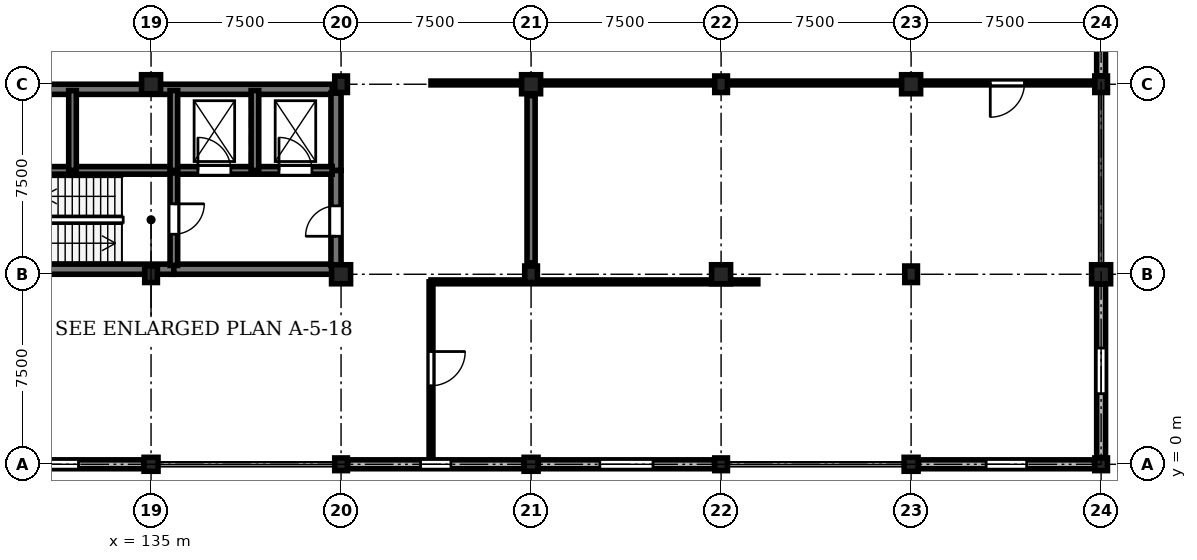
"""IFC4 building model, lengths in metres.
Left out: names, types, materials, properties, quantities, classifications, styles, units other than length and angle.
Written with IfcOpenShell. Run it as: python <this file> out.ifc"""

import sys

from ifc_helpers import new_model, si_unit, direction, frame, frame_2d, origin, origin_2d, place, context, subcontext, project, spatial, rectangle, extrude, element, fill, save


model = new_model("IFC4")
c1 = context("Model", 3, precision=1e-05, world=origin(), true_north=direction((0.0, 1.0)))
c2 = subcontext(c1, "Body", "Model", "MODEL_VIEW")
j1 = project(units=[si_unit("LENGTHUNIT", "METRE"), si_unit("PLANEANGLEUNIT", "RADIAN")], contexts=[c1])
p1 = place(None, origin())
s1 = spatial("IfcSite", under=j1, at=p1, CompositionType="ELEMENT")
p2 = place(p1, origin())
s2 = spatial("IfcBuilding", under=s1, at=p2, CompositionType="ELEMENT")
p3 = place(p2, frame((0.0, 0.0, 4.8)))
s3 = spatial("IfcBuildingStorey", under=s2, at=p3, CompositionType="ELEMENT", Elevation=4.8)
p4 = place(p3, frame((135.0, 0.0, 0.0), z_axis=(0.0, 0.0, 1.0), x_axis=(1.0, 0.0, 0.0)))
e1 = element("IfcColumn", 1, at=p4, inside=s3, PredefinedType="COLUMN", context=c2, shape_type="SweptSolid", body=[
    extrude(rectangle(XDim=0.55, YDim=0.55, at=origin_2d()), origin(), (0.0, 0.0, 1.0), 4.5),
])
p5 = place(p3, frame((135.0, 7.5, 0.0), z_axis=(0.0, 0.0, 1.0), x_axis=(1.0, 0.0, 0.0)))
e2 = element("IfcColumn", 2, at=p5, inside=s3, PredefinedType="COLUMN", context=c2, shape_type="SweptSolid", body=[
    extrude(rectangle(XDim=0.5, YDim=0.65, at=origin_2d()), origin(), (0.0, 0.0, 1.0), 4.5),
])
p6 = place(p3, frame((135.0, 15.0, 0.0), z_axis=(0.0, 0.0, 1.0), x_axis=(1.0, 0.0, 0.0)))
e3 = element("IfcColumn", 3, at=p6, inside=s3, PredefinedType="COLUMN", context=c2, shape_type="SweptSolid", body=[
    extrude(rectangle(XDim=0.75, YDim=0.75, at=origin_2d()), origin(), (0.0, 0.0, 1.0), 4.5),
])
p7 = place(p3, frame((142.5, 0.0, 0.0), z_axis=(0.0, 0.0, 1.0), x_axis=(1.0, 0.0, 0.0)))
e4 = element("IfcColumn", 4, at=p7, inside=s3, PredefinedType="COLUMN", context=c2, shape_type="SweptSolid", body=[
    extrude(rectangle(XDim=0.5, YDim=0.5, at=origin_2d()), origin(), (0.0, 0.0, 1.0), 4.5),
])
p8 = place(p3, frame((142.5, 7.5, 0.0), z_axis=(0.0, 0.0, 1.0), x_axis=(1.0, 0.0, 0.0)))
e5 = element("IfcColumn", 5, at=p8, inside=s3, PredefinedType="COLUMN", context=c2, shape_type="SweptSolid", body=[
    extrude(rectangle(XDim=0.75, YDim=0.75, at=origin_2d()), origin(), (0.0, 0.0, 1.0), 4.5),
])
p9 = place(p3, frame((142.5, 15.0, 0.0), z_axis=(0.0, 0.0, 1.0), x_axis=(1.0, 0.0, 0.0)))
e6 = element("IfcColumn", 6, at=p9, inside=s3, PredefinedType="COLUMN", context=c2, shape_type="SweptSolid", body=[
    extrude(rectangle(XDim=0.5, YDim=0.65, at=origin_2d()), origin(), (0.0, 0.0, 1.0), 4.5),
])
p10 = place(p3, frame((150.0, 0.0, 0.0), z_axis=(0.0, 0.0, 1.0), x_axis=(1.0, 0.0, 0.0)))
e7 = element("IfcColumn", 7, at=p10, inside=s3, PredefinedType="COLUMN", context=c2, shape_type="SweptSolid", body=[
    extrude(rectangle(XDim=0.55, YDim=0.55, at=origin_2d()), origin(), (0.0, 0.0, 1.0), 4.5),
])
p11 = place(p3, frame((150.0, 7.5, 0.0), z_axis=(0.0, 0.0, 1.0), x_axis=(1.0, 0.0, 0.0)))
e8 = element("IfcColumn", 8, at=p11, inside=s3, PredefinedType="COLUMN", context=c2, shape_type="SweptSolid", body=[
    extrude(rectangle(XDim=0.5, YDim=0.65, at=origin_2d()), origin(), (0.0, 0.0, 1.0), 4.5),
])
p12 = place(p3, frame((150.0, 15.0, 0.0), z_axis=(0.0, 0.0, 1.0), x_axis=(1.0, 0.0, 0.0)))
e9 = element("IfcColumn", 9, at=p12, inside=s3, PredefinedType="COLUMN", context=c2, shape_type="SweptSolid", body=[
    extrude(rectangle(XDim=0.75, YDim=0.75, at=origin_2d()), origin(), (0.0, 0.0, 1.0), 4.5),
])
p13 = place(p3, frame((157.5, 0.0, 0.0), z_axis=(0.0, 0.0, 1.0), x_axis=(1.0, 0.0, 0.0)))
e10 = element("IfcColumn", 10, at=p13, inside=s3, PredefinedType="COLUMN", context=c2, shape_type="SweptSolid", body=[
    extrude(rectangle(XDim=0.5, YDim=0.5, at=origin_2d()), origin(), (0.0, 0.0, 1.0), 4.5),
])
p14 = place(p3, frame((157.5, 7.5, 0.0), z_axis=(0.0, 0.0, 1.0), x_axis=(1.0, 0.0, 0.0)))
e11 = element("IfcColumn", 11, at=p14, inside=s3, PredefinedType="COLUMN", context=c2, shape_type="SweptSolid", body=[
    extrude(rectangle(XDim=0.75, YDim=0.75, at=origin_2d()), origin(), (0.0, 0.0, 1.0), 4.5),
])
p15 = place(p3, frame((157.5, 15.0, 0.0), z_axis=(0.0, 0.0, 1.0), x_axis=(1.0, 0.0, 0.0)))
e12 = element("IfcColumn", 12, at=p15, inside=s3, PredefinedType="COLUMN", context=c2, shape_type="SweptSolid", body=[
    extrude(rectangle(XDim=0.5, YDim=0.65, at=origin_2d()), origin(), (0.0, 0.0, 1.0), 4.5),
])
p16 = place(p3, frame((165.0, 0.0, 0.0), z_axis=(0.0, 0.0, 1.0), x_axis=(1.0, 0.0, 0.0)))
e13 = element("IfcColumn", 13, at=p16, inside=s3, PredefinedType="COLUMN", context=c2, shape_type="SweptSolid", body=[
    extrude(rectangle(XDim=0.55, YDim=0.55, at=origin_2d()), origin(), (0.0, 0.0, 1.0), 4.5),
])
p17 = place(p3, frame((165.0, 7.5, 0.0), z_axis=(0.0, 0.0, 1.0), x_axis=(1.0, 0.0, 0.0)))
e14 = element("IfcColumn", 14, at=p17, inside=s3, PredefinedType="COLUMN", context=c2, shape_type="SweptSolid", body=[
    extrude(rectangle(XDim=0.5, YDim=0.65, at=origin_2d()), origin(), (0.0, 0.0, 1.0), 4.5),
])
p18 = place(p3, frame((165.0, 15.0, 0.0), z_axis=(0.0, 0.0, 1.0), x_axis=(1.0, 0.0, 0.0)))
e15 = element("IfcColumn", 15, at=p18, inside=s3, PredefinedType="COLUMN", context=c2, shape_type="SweptSolid", body=[
    extrude(rectangle(XDim=0.75, YDim=0.75, at=origin_2d()), origin(), (0.0, 0.0, 1.0), 4.5),
])
p19 = place(p3, frame((172.5, 0.0, 0.0), z_axis=(0.0, 0.0, 1.0), x_axis=(1.0, 0.0, 0.0)))
e16 = element("IfcColumn", 16, at=p19, inside=s3, PredefinedType="COLUMN", context=c2, shape_type="SweptSolid", body=[
    extrude(rectangle(XDim=0.5, YDim=0.5, at=origin_2d()), origin(), (0.0, 0.0, 1.0), 4.5),
])
p20 = place(p3, frame((172.5, 7.5, 0.0), z_axis=(0.0, 0.0, 1.0), x_axis=(1.0, 0.0, 0.0)))
e17 = element("IfcColumn", 17, at=p20, inside=s3, PredefinedType="COLUMN", context=c2, shape_type="SweptSolid", body=[
    extrude(rectangle(XDim=0.75, YDim=0.75, at=origin_2d()), origin(), (0.0, 0.0, 1.0), 4.5),
])
p21 = place(p3, frame((172.5, 15.0, 0.0), z_axis=(0.0, 0.0, 1.0), x_axis=(1.0, 0.0, 0.0)))
e18 = element("IfcColumn", 18, at=p21, inside=s3, PredefinedType="COLUMN", context=c2, shape_type="SweptSolid", body=[
    extrude(rectangle(XDim=0.5, YDim=0.65, at=origin_2d()), origin(), (0.0, 0.0, 1.0), 4.5),
])
p22 = place(p3, frame((150.0, 7.95, 0.0), z_axis=(0.0, 0.0, 1.0), x_axis=(0.0, 1.0, 0.0)))
e19 = element("IfcWall", 19, at=p22, inside=s3, PredefinedType="SHEAR", context=c2, shape_type="SweptSolid", body=[
    extrude(rectangle(XDim=6.6, YDim=0.32, at=frame_2d((3.3, 0.0))), origin(), (0.0, 0.0, 1.0), 3.63),
])
p23 = place(p3, frame((134.715, 0.0, 0.0), z_axis=(0.0, 0.0, 1.0), x_axis=(-1.0, 0.0, 0.0)))
e20 = element("IfcWall", 20, at=p23, inside=s3, PredefinedType="STANDARD", context=c2, shape_type="SweptSolid", body=[
    extrude(rectangle(XDim=6.955, YDim=0.35, at=frame_2d((3.478, 0.0))), origin(), (0.0, 0.0, 1.0), 3.63),
])
p24 = place(p23, frame((2.577, 0.0, 0.9)))
e21 = element("IfcOpeningElement", 21, at=p24, cuts=e20, PredefinedType="OPENING", context=c2, shape_type="SweptSolid", body=[
    extrude(rectangle(XDim=1.8, YDim=2.1, at=frame_2d((0.9, 1.05))), frame((0.0, 0.185, 0.0), z_axis=(0.0, -1.0, 0.0), x_axis=(1.0, 0.0, 0.0)), (0.0, 0.0, 1.0), 0.37),
])
p25 = place(p3, frame((149.715, 0.0, 0.0), z_axis=(0.0, 0.0, 1.0), x_axis=(-1.0, 0.0, 0.0)))
e22 = element("IfcWall", 22, at=p25, inside=s3, PredefinedType="STANDARD", context=c2, shape_type="SweptSolid", body=[
    extrude(rectangle(XDim=6.955, YDim=0.35, at=frame_2d((3.478, 0.0))), origin(), (0.0, 0.0, 1.0), 3.63),
])
p26 = place(p25, frame((2.877, 0.0, 0.9)))
e23 = element("IfcOpeningElement", 23, at=p26, cuts=e22, PredefinedType="OPENING", context=c2, shape_type="SweptSolid", body=[
    extrude(rectangle(XDim=1.2, YDim=2.1, at=frame_2d((0.6, 1.05))), frame((0.0, 0.185, 0.0), z_axis=(0.0, -1.0, 0.0), x_axis=(1.0, 0.0, 0.0)), (0.0, 0.0, 1.0), 0.37),
])
p27 = place(p3, frame((157.24, 0.0, 0.0), z_axis=(0.0, 0.0, 1.0), x_axis=(-1.0, 0.0, 0.0)))
e24 = element("IfcWall", 24, at=p27, inside=s3, PredefinedType="STANDARD", context=c2, shape_type="SweptSolid", body=[
    extrude(rectangle(XDim=6.955, YDim=0.35, at=frame_2d((3.478, 0.0))), origin(), (0.0, 0.0, 1.0), 3.63),
])
p28 = place(p27, frame((2.427, 0.0, 0.9)))
e25 = element("IfcOpeningElement", 25, at=p28, cuts=e24, PredefinedType="OPENING", context=c2, shape_type="SweptSolid", body=[
    extrude(rectangle(XDim=2.1, YDim=2.1, at=frame_2d((1.05, 1.05))), frame((0.0, 0.185, 0.0), z_axis=(0.0, -1.0, 0.0), x_axis=(1.0, 0.0, 0.0)), (0.0, 0.0, 1.0), 0.37),
])
p29 = place(p3, frame((172.24, 0.0, 0.0), z_axis=(0.0, 0.0, 1.0), x_axis=(-1.0, 0.0, 0.0)))
e26 = element("IfcWall", 26, at=p29, inside=s3, PredefinedType="STANDARD", context=c2, shape_type="SweptSolid", body=[
    extrude(rectangle(XDim=6.955, YDim=0.35, at=frame_2d((3.478, 0.0))), origin(), (0.0, 0.0, 1.0), 3.63),
])
p30 = place(p29, frame((2.677, 0.0, 0.9)))
e27 = element("IfcOpeningElement", 27, at=p30, cuts=e26, PredefinedType="OPENING", context=c2, shape_type="SweptSolid", body=[
    extrude(rectangle(XDim=1.6, YDim=1.95, at=frame_2d((0.8, 0.975))), frame((0.0, 0.185, 0.0), z_axis=(0.0, -1.0, 0.0), x_axis=(1.0, 0.0, 0.0)), (0.0, 0.0, 1.0), 0.37),
])
p31 = place(p3, frame((172.5, 7.115, 0.0), z_axis=(0.0, 0.0, 1.0), x_axis=(0.0, -1.0, 0.0)))
e28 = element("IfcWall", 28, at=p31, inside=s3, PredefinedType="STANDARD", context=c2, shape_type="SweptSolid", body=[
    extrude(rectangle(XDim=6.855, YDim=0.35, at=frame_2d((3.427, 0.0))), origin(), (0.0, 0.0, 1.0), 3.63),
])
p32 = place(p31, frame((2.528, 0.0, 0.9)))
e29 = element("IfcOpeningElement", 29, at=p32, cuts=e28, PredefinedType="OPENING", context=c2, shape_type="SweptSolid", body=[
    extrude(rectangle(XDim=1.8, YDim=1.95, at=frame_2d((0.9, 0.975))), frame((0.0, 0.185, 0.0), z_axis=(0.0, -1.0, 0.0), x_axis=(1.0, 0.0, 0.0)), (0.0, 0.0, 1.0), 0.37),
])
p33 = place(p3, frame((172.5, 22.115, 0.0), z_axis=(0.0, 0.0, 1.0), x_axis=(0.0, -1.0, 0.0)))
e30 = element("IfcWall", 30, at=p33, inside=s3, PredefinedType="STANDARD", context=c2, shape_type="SweptSolid", body=[
    extrude(rectangle(XDim=6.78, YDim=0.35, at=frame_2d((3.39, 0.0))), origin(), (0.0, 0.0, 1.0), 3.63),
])
p34 = place(p33, frame((2.29, 0.0, 0.9)))
e31 = element("IfcOpeningElement", 31, at=p34, cuts=e30, PredefinedType="OPENING", context=c2, shape_type="SweptSolid", body=[
    extrude(rectangle(XDim=2.2, YDim=1.95, at=frame_2d((1.1, 0.975))), frame((0.0, 0.185, 0.0), z_axis=(0.0, -1.0, 0.0), x_axis=(1.0, 0.0, 0.0)), (0.0, 0.0, 1.0), 0.37),
])
p35 = place(p3, frame((127.85, 7.7, 0.0), z_axis=(0.0, 0.0, 1.0), x_axis=(1.0, 0.0, 0.0)))
e32 = element("IfcWall", 32, at=p35, inside=s3, PredefinedType="SHEAR", context=c2, shape_type="SweptSolid", body=[
    extrude(rectangle(XDim=8.05, YDim=0.4, at=frame_2d((4.025, 0.0))), origin(), (0.0, 0.0, 1.0), 4.18),
])
p36 = place(p3, frame((135.9, 7.7, 0.0), z_axis=(0.0, 0.0, 1.0), x_axis=(1.0, 0.0, 0.0)))
e33 = element("IfcWall", 33, at=p36, inside=s3, PredefinedType="SHEAR", context=c2, shape_type="SweptSolid", body=[
    extrude(rectangle(XDim=6.25, YDim=0.4, at=frame_2d((3.125, 0.0))), origin(), (0.0, 0.0, 1.0), 4.18),
])
p37 = place(p3, frame((127.85, 14.8, 0.0), z_axis=(0.0, 0.0, 1.0), x_axis=(1.0, 0.0, 0.0)))
e34 = element("IfcWall", 34, at=p37, inside=s3, PredefinedType="SHEAR", context=c2, shape_type="SweptSolid", body=[
    extrude(rectangle(XDim=14.3, YDim=0.4, at=frame_2d((7.15, 0.0))), origin(), (0.0, 0.0, 1.0), 4.18),
])
p38 = place(p3, frame((142.3, 7.85, 0.0), z_axis=(0.0, 0.0, 1.0), x_axis=(0.0, 1.0, 0.0)))
e35 = element("IfcWall", 35, at=p38, inside=s3, PredefinedType="SHEAR", context=c2, shape_type="SweptSolid", body=[
    extrude(rectangle(XDim=3.75, YDim=0.4, at=frame_2d((1.875, 0.0))), origin(), (0.0, 0.0, 1.0), 4.18),
])
p39 = place(p38, frame((1.15, 0.0, 0.0)))
e36 = element("IfcOpeningElement", 36, at=p39, cuts=e35, PredefinedType="OPENING", context=c2, shape_type="SweptSolid", body=[
    extrude(rectangle(XDim=1.2, YDim=2.25, at=frame_2d((0.6, 1.125))), frame((0.0, 0.21, 0.0), z_axis=(0.0, -1.0, 0.0), x_axis=(1.0, 0.0, 0.0)), (0.0, 0.0, 1.0), 0.42),
])
p40 = place(p3, frame((142.3, 11.6, 0.0), z_axis=(0.0, 0.0, 1.0), x_axis=(0.0, 1.0, 0.0)))
e37 = element("IfcWall", 37, at=p40, inside=s3, PredefinedType="SHEAR", context=c2, shape_type="SweptSolid", body=[
    extrude(rectangle(XDim=3.05, YDim=0.4, at=frame_2d((1.525, 0.0))), origin(), (0.0, 0.0, 1.0), 4.18),
])
p41 = place(p3, frame((127.85, 11.6, 0.0), z_axis=(0.0, 0.0, 1.0), x_axis=(1.0, 0.0, 0.0)))
e38 = element("IfcWall", 38, at=p41, inside=s3, PredefinedType="SHEAR", context=c2, shape_type="SweptSolid", body=[
    extrude(rectangle(XDim=8.05, YDim=0.3, at=frame_2d((4.025, 0.0))), origin(), (0.0, 0.0, 1.0), 4.18),
])
p42 = place(p3, frame((135.9, 11.6, 0.0), z_axis=(0.0, 0.0, 1.0), x_axis=(1.0, 0.0, 0.0)))
e39 = element("IfcWall", 39, at=p42, inside=s3, PredefinedType="SHEAR", context=c2, shape_type="SweptSolid", body=[
    extrude(rectangle(XDim=6.25, YDim=0.3, at=frame_2d((3.125, 0.0))), origin(), (0.0, 0.0, 1.0), 4.18),
])
p43 = place(p42, frame((0.95, 0.0, 0.0)))
e40 = element("IfcOpeningElement", 40, at=p43, cuts=e39, PredefinedType="OPENING", context=c2, shape_type="SweptSolid", body=[
    extrude(rectangle(XDim=1.3, YDim=2.2, at=frame_2d((0.65, 1.1))), frame((0.0, 0.16, 0.0), z_axis=(0.0, -1.0, 0.0), x_axis=(1.0, 0.0, 0.0)), (0.0, 0.0, 1.0), 0.32),
])
p44 = place(p42, frame((4.15, 0.0, 0.0)))
e41 = element("IfcOpeningElement", 41, at=p44, cuts=e39, PredefinedType="OPENING", context=c2, shape_type="SweptSolid", body=[
    extrude(rectangle(XDim=1.3, YDim=2.2, at=frame_2d((0.65, 1.1))), frame((0.0, 0.16, 0.0), z_axis=(0.0, -1.0, 0.0), x_axis=(1.0, 0.0, 0.0)), (0.0, 0.0, 1.0), 0.32),
])
p45 = place(p3, frame((135.9, 11.5, 0.0), z_axis=(0.0, 0.0, 1.0), x_axis=(0.0, -1.0, 0.0)))
e42 = element("IfcWall", 42, at=p45, inside=s3, PredefinedType="SHEAR", context=c2, shape_type="SweptSolid", body=[
    extrude(rectangle(XDim=3.65, YDim=0.3, at=frame_2d((1.825, 0.0))), origin(), (0.0, 0.0, 1.0), 4.18),
])
p46 = place(p45, frame((1.22, 0.0, 0.0)))
e43 = element("IfcOpeningElement", 43, at=p46, cuts=e42, PredefinedType="OPENING", context=c2, shape_type="SweptSolid", body=[
    extrude(rectangle(XDim=1.2, YDim=2.25, at=frame_2d((0.6, 1.125))), frame((0.0, 0.16, 0.0), z_axis=(0.0, -1.0, 0.0), x_axis=(1.0, 0.0, 0.0)), (0.0, 0.0, 1.0), 0.32),
])
for number, where, z_axis, x_axis in (
    (44, (131.9, 11.6, 0.0), (0.0, 0.0, 1.0), (0.0, 1.0, 0.0)),
    (45, (135.9, 11.6, 0.0), (0.0, 0.0, 1.0), (0.0, 1.0, 0.0)),
    (46, (139.1, 11.6, 0.0), (0.0, 0.0, 1.0), (0.0, 1.0, 0.0)),
):
    element("IfcWall", number, at=place(p3, frame(where, z_axis=z_axis, x_axis=x_axis)), inside=s3, PredefinedType="SHEAR", context=c2, shape_type="SweptSolid", body=[
        extrude(rectangle(XDim=3.15, YDim=0.3, at=frame_2d((1.575, 0.0))), origin(), (0.0, 0.0, 1.0), 4.18),
    ])
p47 = place(p3, frame((146.05, 7.2, 0.0), z_axis=(0.0, 0.0, 1.0), x_axis=(0.0, -1.0, 0.0)))
e47 = element("IfcWall", 47, at=p47, inside=s3, PredefinedType="PARTITIONING", context=c2, shape_type="SweptSolid", body=[
    extrude(rectangle(XDim=6.85, YDim=0.15, at=frame_2d((3.425, 0.0))), origin(), (0.0, 0.0, 1.0), 4.165),
])
p48 = place(p47, frame((2.75, 0.0, 0.0)))
e48 = element("IfcOpeningElement", 48, at=p48, cuts=e47, PredefinedType="OPENING", context=c2, shape_type="SweptSolid", body=[
    extrude(rectangle(XDim=1.35, YDim=2.25, at=frame_2d((0.675, 1.125))), frame((0.0, 0.085, 0.0), z_axis=(0.0, -1.0, 0.0), x_axis=(1.0, 0.0, 0.0)), (0.0, 0.0, 1.0), 0.17),
])
p49 = place(p3, frame((172.15, 15.05, 0.0), z_axis=(0.0, 0.0, 1.0), x_axis=(-1.0, 0.0, 0.0)))
e49 = element("IfcWall", 49, at=p49, inside=s3, PredefinedType="PARTITIONING", context=c2, shape_type="SweptSolid", body=[
    extrude(rectangle(XDim=26.1, YDim=0.15, at=frame_2d((13.05, 0.0))), origin(), (0.0, 0.0, 1.0), 3.515),
])
p50 = place(p49, frame((2.675, 0.0, 0.0)))
e50 = element("IfcOpeningElement", 50, at=p50, cuts=e49, PredefinedType="OPENING", context=c2, shape_type="SweptSolid", body=[
    extrude(rectangle(XDim=1.35, YDim=2.25, at=frame_2d((0.675, 1.125))), frame((0.0, 0.085, 0.0), z_axis=(0.0, -1.0, 0.0), x_axis=(1.0, 0.0, 0.0)), (0.0, 0.0, 1.0), 0.17),
])
p51 = place(p3, frame((146.05, 7.2, 0.0), z_axis=(0.0, 0.0, 1.0), x_axis=(1.0, 0.0, 0.0)))
e51 = element("IfcWall", 51, at=p51, inside=s3, PredefinedType="PARTITIONING", context=c2, shape_type="SweptSolid", body=[
    extrude(rectangle(XDim=12.9, YDim=0.15, at=frame_2d((6.45, 0.0))), origin(), (0.0, 0.0, 1.0), 3.515),
])
p52 = place(p24, origin())
e52 = element("IfcWindow", 52, at=p52, inside=s3, PartitioningType="SINGLE_PANEL", PredefinedType="WINDOW", context=c2, shape_type="SweptSolid", body=[
    extrude(rectangle(XDim=1.8, YDim=2.1, at=frame_2d((0.9, 1.05))), frame((0.0, 0.03, 0.0), z_axis=(0.0, -1.0, 0.0), x_axis=(1.0, 0.0, 0.0)), (0.0, 0.0, 1.0), 0.06),
])
fill(e21, e52)
p53 = place(p26, origin())
e53 = element("IfcWindow", 53, at=p53, inside=s3, PartitioningType="SINGLE_PANEL", PredefinedType="WINDOW", context=c2, shape_type="SweptSolid", body=[
    extrude(rectangle(XDim=1.2, YDim=2.1, at=frame_2d((0.6, 1.05))), frame((0.0, 0.03, 0.0), z_axis=(0.0, -1.0, 0.0), x_axis=(1.0, 0.0, 0.0)), (0.0, 0.0, 1.0), 0.06),
])
fill(e23, e53)
p54 = place(p28, origin())
e54 = element("IfcWindow", 54, at=p54, inside=s3, PartitioningType="SINGLE_PANEL", PredefinedType="WINDOW", context=c2, shape_type="SweptSolid", body=[
    extrude(rectangle(XDim=2.1, YDim=2.1, at=frame_2d((1.05, 1.05))), frame((0.0, 0.03, 0.0), z_axis=(0.0, -1.0, 0.0), x_axis=(1.0, 0.0, 0.0)), (0.0, 0.0, 1.0), 0.06),
])
fill(e25, e54)
p55 = place(p30, origin())
e55 = element("IfcWindow", 55, at=p55, inside=s3, PartitioningType="SINGLE_PANEL", PredefinedType="WINDOW", context=c2, shape_type="SweptSolid", body=[
    extrude(rectangle(XDim=1.6, YDim=1.95, at=frame_2d((0.8, 0.975))), frame((0.0, 0.03, 0.0), z_axis=(0.0, -1.0, 0.0), x_axis=(1.0, 0.0, 0.0)), (0.0, 0.0, 1.0), 0.06),
])
fill(e27, e55)
p56 = place(p32, origin())
e56 = element("IfcWindow", 56, at=p56, inside=s3, PartitioningType="SINGLE_PANEL", PredefinedType="WINDOW", context=c2, shape_type="SweptSolid", body=[
    extrude(rectangle(XDim=1.8, YDim=1.95, at=frame_2d((0.9, 0.975))), frame((0.0, 0.03, 0.0), z_axis=(0.0, -1.0, 0.0), x_axis=(1.0, 0.0, 0.0)), (0.0, 0.0, 1.0), 0.06),
])
fill(e29, e56)
p57 = place(p39, origin())
e57 = element("IfcDoor", 57, at=p57, inside=s3, OperationType="SINGLE_SWING_LEFT", PredefinedType="DOOR", context=c2, shape_type="SweptSolid", body=[
    extrude(rectangle(XDim=1.2, YDim=2.25, at=frame_2d((0.6, 1.125))), frame((0.0, 0.025, 0.0), z_axis=(0.0, -1.0, 0.0), x_axis=(1.0, 0.0, 0.0)), (0.0, 0.0, 1.0), 0.05),
])
fill(e36, e57)
p58 = place(p43, origin())
e58 = element("IfcDoor", 58, at=p58, inside=s3, OperationType="DOUBLE_DOOR_SLIDING", PredefinedType="DOOR", context=c2, shape_type="SweptSolid", body=[
    extrude(rectangle(XDim=1.3, YDim=2.2, at=frame_2d((0.65, 1.1))), frame((0.0, 0.025, 0.0), z_axis=(0.0, -1.0, 0.0), x_axis=(1.0, 0.0, 0.0)), (0.0, 0.0, 1.0), 0.05),
])
fill(e40, e58)
p59 = place(p44, origin())
e59 = element("IfcDoor", 59, at=p59, inside=s3, OperationType="DOUBLE_DOOR_SLIDING", PredefinedType="DOOR", context=c2, shape_type="SweptSolid", body=[
    extrude(rectangle(XDim=1.3, YDim=2.2, at=frame_2d((0.65, 1.1))), frame((0.0, 0.025, 0.0), z_axis=(0.0, -1.0, 0.0), x_axis=(1.0, 0.0, 0.0)), (0.0, 0.0, 1.0), 0.05),
])
fill(e41, e59)
p60 = place(p46, origin())
e60 = element("IfcDoor", 60, at=p60, inside=s3, OperationType="SINGLE_SWING_LEFT", PredefinedType="DOOR", context=c2, shape_type="SweptSolid", body=[
    extrude(rectangle(XDim=1.2, YDim=2.25, at=frame_2d((0.6, 1.125))), frame((0.0, 0.025, 0.0), z_axis=(0.0, -1.0, 0.0), x_axis=(1.0, 0.0, 0.0)), (0.0, 0.0, 1.0), 0.05),
])
fill(e43, e60)
p61 = place(p48, origin())
e61 = element("IfcDoor", 61, at=p61, inside=s3, OperationType="SINGLE_SWING_LEFT", PredefinedType="DOOR", context=c2, shape_type="SweptSolid", body=[
    extrude(rectangle(XDim=1.35, YDim=2.25, at=frame_2d((0.675, 1.125))), frame((0.0, 0.025, 0.0), z_axis=(0.0, -1.0, 0.0), x_axis=(1.0, 0.0, 0.0)), (0.0, 0.0, 1.0), 0.05),
])
fill(e48, e61)
p62 = place(p50, origin())
e62 = element("IfcDoor", 62, at=p62, inside=s3, OperationType="SINGLE_SWING_RIGHT", PredefinedType="DOOR", context=c2, shape_type="SweptSolid", body=[
    extrude(rectangle(XDim=1.35, YDim=2.25, at=frame_2d((0.675, 1.125))), frame((0.0, 0.025, 0.0), z_axis=(0.0, -1.0, 0.0), x_axis=(1.0, 0.0, 0.0)), (0.0, 0.0, 1.0), 0.05),
])
fill(e50, e62)
save(model, sys.argv[1])
